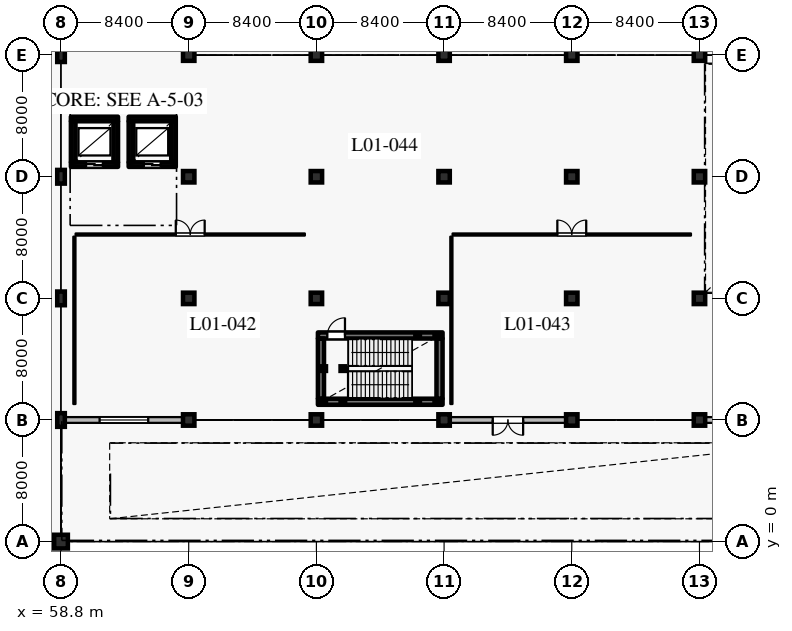
"""IFC4 building model, lengths in metres.
Left out: names, types, materials, properties, quantities, classifications, styles, units other than length and angle.
Written with IfcOpenShell. Run it as: python <this file> out.ifc"""

import sys

from ifc_helpers import new_model, si_unit, direction, frame, frame_2d, origin, origin_2d, place, context, subcontext, project, spatial, rectangle, hollow_rectangle, extrude, element, fill, save


model = new_model("IFC4")
c1 = context("Model", 3, precision=1e-05, world=origin(), true_north=direction((0.0, 1.0)))
c2 = subcontext(c1, "Body", "Model", "MODEL_VIEW")
j1 = project(units=[si_unit("LENGTHUNIT", "METRE"), si_unit("PLANEANGLEUNIT", "RADIAN")], contexts=[c1])
p1 = place(None, origin())
s1 = spatial("IfcSite", under=j1, at=p1, CompositionType="ELEMENT")
p2 = place(p1, origin())
s2 = spatial("IfcBuilding", under=s1, at=p2, CompositionType="ELEMENT")
p3 = place(p2, frame((0.0, 0.0, 6.0)))
s3 = spatial("IfcBuildingStorey", under=s2, at=p3, CompositionType="ELEMENT", Elevation=6.0)
p4 = place(p3, frame((58.8, 0.0, 0.0), z_axis=(0.0, 0.0, 1.0), x_axis=(1.0, 0.0, 0.0)))
e1 = element("IfcColumn", 1, at=p4, inside=s3, PredefinedType="COLUMN", context=c2, shape_type="SweptSolid", body=[
    extrude(rectangle(XDim=0.9, YDim=0.9, at=origin_2d()), origin(), (0.0, 0.0, 1.0), 5.4),
])
for number, where, z_axis, x_axis in (
    (2, (58.8, 8.0, 0.0), (0.0, 0.0, 1.0), (1.0, 0.0, 0.0)),
    (3, (58.8, 16.0, 0.0), (0.0, 0.0, 1.0), (1.0, 0.0, 0.0)),
    (4, (58.8, 24.0, 0.0), (0.0, 0.0, 1.0), (1.0, 0.0, 0.0)),
    (5, (58.8, 32.0, 0.0), (0.0, 0.0, 1.0), (1.0, 0.0, 0.0)),
):
    element("IfcColumn", number, at=place(p3, frame(where, z_axis=z_axis, x_axis=x_axis)), inside=s3, PredefinedType="COLUMN", context=c2, shape_type="SweptSolid", body=[
        extrude(hollow_rectangle(XDim=0.5, YDim=0.9, WallThickness=0.024, at=origin_2d()), origin(), (0.0, 0.0, 1.0), 5.4),
    ])
for number, where, z_axis, x_axis in (
    (6, (67.2, 8.0, 0.0), (0.0, 0.0, 1.0), (1.0, 0.0, 0.0)),
    (7, (67.2, 16.0, 0.0), (0.0, 0.0, 1.0), (1.0, 0.0, 0.0)),
    (8, (67.2, 24.0, 0.0), (0.0, 0.0, 1.0), (1.0, 0.0, 0.0)),
    (9, (67.2, 32.0, 0.0), (0.0, 0.0, 1.0), (1.0, 0.0, 0.0)),
    (10, (75.6, 8.0, 0.0), (0.0, 0.0, 1.0), (1.0, 0.0, 0.0)),
    (11, (75.6, 16.0, 0.0), (0.0, 0.0, 1.0), (1.0, 0.0, 0.0)),
    (12, (75.6, 24.0, 0.0), (0.0, 0.0, 1.0), (1.0, 0.0, 0.0)),
    (13, (75.6, 32.0, 0.0), (0.0, 0.0, 1.0), (1.0, 0.0, 0.0)),
    (14, (84.0, 8.0, 0.0), (0.0, 0.0, 1.0), (1.0, 0.0, 0.0)),
    (15, (84.0, 16.0, 0.0), (0.0, 0.0, 1.0), (1.0, 0.0, 0.0)),
    (16, (84.0, 24.0, 0.0), (0.0, 0.0, 1.0), (1.0, 0.0, 0.0)),
    (17, (84.0, 32.0, 0.0), (0.0, 0.0, 1.0), (1.0, 0.0, 0.0)),
    (18, (92.4, 8.0, 0.0), (0.0, 0.0, 1.0), (1.0, 0.0, 0.0)),
    (19, (92.4, 16.0, 0.0), (0.0, 0.0, 1.0), (1.0, 0.0, 0.0)),
    (20, (92.4, 24.0, 0.0), (0.0, 0.0, 1.0), (1.0, 0.0, 0.0)),
    (21, (92.4, 32.0, 0.0), (0.0, 0.0, 1.0), (1.0, 0.0, 0.0)),
    (22, (100.8, 8.0, 0.0), (0.0, 0.0, 1.0), (1.0, 0.0, 0.0)),
    (23, (100.8, 16.0, 0.0), (0.0, 0.0, 1.0), (1.0, 0.0, 0.0)),
    (24, (100.8, 24.0, 0.0), (0.0, 0.0, 1.0), (1.0, 0.0, 0.0)),
    (25, (100.8, 32.0, 0.0), (0.0, 0.0, 1.0), (1.0, 0.0, 0.0)),
):
    element("IfcColumn", number, at=place(p3, frame(where, z_axis=z_axis, x_axis=x_axis)), inside=s3, PredefinedType="COLUMN", context=c2, shape_type="SweptSolid", body=[
        extrude(rectangle(XDim=0.75, YDim=0.75, at=origin_2d()), origin(), (0.0, 0.0, 1.0), 5.4),
    ])
p5 = place(p3, frame((58.35, 0.0, 0.0), z_axis=(0.0, 0.0, 1.0), x_axis=(-1.0, 0.0, 0.0)))
e26 = element("IfcWall", 26, at=p5, inside=s3, PredefinedType="SOLIDWALL", context=c2, shape_type="SweptSolid", body=[
    extrude(rectangle(XDim=7.5, YDim=0.34, at=frame_2d((3.75, 0.0))), origin(), (0.0, 0.0, 1.0), 4.42),
])
p6 = place(p5, frame((1.95, 0.0, 1.0)))
e27 = element("IfcOpeningElement", 27, at=p6, cuts=e26, PredefinedType="OPENING", context=c2, shape_type="SweptSolid", body=[
    extrude(rectangle(XDim=3.6, YDim=2.5, at=frame_2d((1.8, 1.25))), frame((0.0, 0.18, 0.0), z_axis=(0.0, -1.0, 0.0), x_axis=(1.0, 0.0, 0.0)), (0.0, 0.0, 1.0), 0.36),
])
p7 = place(p3, frame((108.825, 8.0, 0.0), z_axis=(0.0, 0.0, 1.0), x_axis=(-1.0, 0.0, 0.0)))
e28 = element("IfcWall", 28, at=p7, inside=s3, PredefinedType="SOLIDWALL", context=c2, shape_type="SweptSolid", body=[
    extrude(rectangle(XDim=7.65, YDim=0.38, at=frame_2d((3.825, 0.0))), origin(), (0.0, 0.0, 1.0), 4.45),
])
p8 = place(p7, frame((2.825, 0.0, 0.0)))
e29 = element("IfcOpeningElement", 29, at=p8, cuts=e28, PredefinedType="OPENING", context=c2, shape_type="SweptSolid", body=[
    extrude(rectangle(XDim=2.0, YDim=2.4, at=frame_2d((1.0, 1.2))), frame((0.0, 0.2, 0.0), z_axis=(0.0, -1.0, 0.0), x_axis=(1.0, 0.0, 0.0)), (0.0, 0.0, 1.0), 0.4),
])
p9 = place(p3, frame((92.025, 8.0, 0.0), z_axis=(0.0, 0.0, 1.0), x_axis=(-1.0, 0.0, 0.0)))
e30 = element("IfcWall", 30, at=p9, inside=s3, PredefinedType="SOLIDWALL", context=c2, shape_type="SweptSolid", body=[
    extrude(rectangle(XDim=7.65, YDim=0.38, at=frame_2d((3.825, 0.0))), origin(), (0.0, 0.0, 1.0), 4.45),
])
p10 = place(p9, frame((2.825, 0.0, 0.0)))
e31 = element("IfcOpeningElement", 31, at=p10, cuts=e30, PredefinedType="OPENING", context=c2, shape_type="SweptSolid", body=[
    extrude(rectangle(XDim=2.0, YDim=2.4, at=frame_2d((1.0, 1.2))), frame((0.0, 0.2, 0.0), z_axis=(0.0, -1.0, 0.0), x_axis=(1.0, 0.0, 0.0)), (0.0, 0.0, 1.0), 0.4),
])
p11 = place(p3, frame((66.825, 8.0, 0.0), z_axis=(0.0, 0.0, 1.0), x_axis=(-1.0, 0.0, 0.0)))
e32 = element("IfcWall", 32, at=p11, inside=s3, PredefinedType="SOLIDWALL", context=c2, shape_type="SweptSolid", body=[
    extrude(rectangle(XDim=7.775, YDim=0.38, at=frame_2d((3.887, 0.0))), origin(), (0.0, 0.0, 1.0), 4.42),
])
p12 = place(p11, frame((2.288, 0.0, 0.95)))
e33 = element("IfcOpeningElement", 33, at=p12, cuts=e32, PredefinedType="OPENING", context=c2, shape_type="SweptSolid", body=[
    extrude(rectangle(XDim=3.2, YDim=2.4, at=frame_2d((1.6, 1.2))), frame((0.0, 0.2, 0.0), z_axis=(0.0, -1.0, 0.0), x_axis=(1.0, 0.0, 0.0)), (0.0, 0.0, 1.0), 0.4),
])
p13 = place(p3, frame((59.45, 24.8, 0.0), z_axis=(0.0, 0.0, 1.0), x_axis=(1.0, 0.0, 0.0)))
e34 = element("IfcWall", 34, at=p13, inside=s3, PredefinedType="SHEAR", context=c2, shape_type="SweptSolid", body=[
    extrude(rectangle(XDim=3.1, YDim=0.3, at=frame_2d((1.55, 0.0))), origin(), (0.0, 0.0, 1.0), 5.045),
])
p14 = place(p13, frame((1.0, 0.0, 0.0)))
e35 = element("IfcOpeningElement", 35, at=p14, cuts=e34, PredefinedType="OPENING", context=c2, shape_type="SweptSolid", body=[
    extrude(rectangle(XDim=1.1, YDim=2.2, at=frame_2d((0.55, 1.1))), frame((0.0, 0.16, 0.0), z_axis=(0.0, -1.0, 0.0), x_axis=(1.0, 0.0, 0.0)), (0.0, 0.0, 1.0), 0.32),
])
p15 = place(p3, frame((62.4, 24.955, 0.0), z_axis=(0.0, 0.0, 1.0), x_axis=(0.0, 1.0, 0.0)))
e36 = element("IfcWall", 36, at=p15, inside=s3, PredefinedType="SHEAR", context=c2, shape_type="SweptSolid", body=[
    extrude(rectangle(XDim=2.69, YDim=0.3, at=frame_2d((1.345, 0.0))), origin(), (0.0, 0.0, 1.0), 5.045),
])
p16 = place(p3, frame((62.55, 27.8, 0.0), z_axis=(0.0, 0.0, 1.0), x_axis=(-1.0, 0.0, 0.0)))
e37 = element("IfcWall", 37, at=p16, inside=s3, PredefinedType="SHEAR", context=c2, shape_type="SweptSolid", body=[
    extrude(rectangle(XDim=3.1, YDim=0.3, at=frame_2d((1.55, 0.0))), origin(), (0.0, 0.0, 1.0), 5.045),
])
p17 = place(p3, frame((59.6, 27.645, 0.0), z_axis=(0.0, 0.0, 1.0), x_axis=(0.0, -1.0, 0.0)))
e38 = element("IfcWall", 38, at=p17, inside=s3, PredefinedType="SHEAR", context=c2, shape_type="SweptSolid", body=[
    extrude(rectangle(XDim=2.69, YDim=0.3, at=frame_2d((1.345, 0.0))), origin(), (0.0, 0.0, 1.0), 5.045),
])
p18 = place(p3, frame((63.25, 24.8, 0.0), z_axis=(0.0, 0.0, 1.0), x_axis=(1.0, 0.0, 0.0)))
e39 = element("IfcWall", 39, at=p18, inside=s3, PredefinedType="SHEAR", context=c2, shape_type="SweptSolid", body=[
    extrude(rectangle(XDim=3.1, YDim=0.3, at=frame_2d((1.55, 0.0))), origin(), (0.0, 0.0, 1.0), 5.045),
])
p19 = place(p18, frame((1.0, 0.0, 0.0)))
e40 = element("IfcOpeningElement", 40, at=p19, cuts=e39, PredefinedType="OPENING", context=c2, shape_type="SweptSolid", body=[
    extrude(rectangle(XDim=1.1, YDim=2.2, at=frame_2d((0.55, 1.1))), frame((0.0, 0.16, 0.0), z_axis=(0.0, -1.0, 0.0), x_axis=(1.0, 0.0, 0.0)), (0.0, 0.0, 1.0), 0.32),
])
p20 = place(p3, frame((66.2, 24.955, 0.0), z_axis=(0.0, 0.0, 1.0), x_axis=(0.0, 1.0, 0.0)))
e41 = element("IfcWall", 41, at=p20, inside=s3, PredefinedType="SHEAR", context=c2, shape_type="SweptSolid", body=[
    extrude(rectangle(XDim=2.69, YDim=0.3, at=frame_2d((1.345, 0.0))), origin(), (0.0, 0.0, 1.0), 5.045),
])
p21 = place(p3, frame((66.35, 27.8, 0.0), z_axis=(0.0, 0.0, 1.0), x_axis=(-1.0, 0.0, 0.0)))
e42 = element("IfcWall", 42, at=p21, inside=s3, PredefinedType="SHEAR", context=c2, shape_type="SweptSolid", body=[
    extrude(rectangle(XDim=3.1, YDim=0.3, at=frame_2d((1.55, 0.0))), origin(), (0.0, 0.0, 1.0), 5.045),
])
p22 = place(p3, frame((63.4, 27.645, 0.0), z_axis=(0.0, 0.0, 1.0), x_axis=(0.0, -1.0, 0.0)))
e43 = element("IfcWall", 43, at=p22, inside=s3, PredefinedType="SHEAR", context=c2, shape_type="SweptSolid", body=[
    extrude(rectangle(XDim=2.69, YDim=0.3, at=frame_2d((1.345, 0.0))), origin(), (0.0, 0.0, 1.0), 5.045),
])
p23 = place(p3, frame((75.7, 9.2, 0.0), z_axis=(0.0, 0.0, 1.0), x_axis=(1.0, 0.0, 0.0)))
e44 = element("IfcWall", 44, at=p23, inside=s3, PredefinedType="SHEAR", context=c2, shape_type="SweptSolid", body=[
    extrude(rectangle(XDim=8.2, YDim=0.4, at=frame_2d((4.1, 0.0))), origin(), (0.0, 0.0, 1.0), 5.045),
])
p24 = place(p3, frame((83.7, 9.405, 0.0), z_axis=(0.0, 0.0, 1.0), x_axis=(0.0, 1.0, 0.0)))
e45 = element("IfcWall", 45, at=p24, inside=s3, PredefinedType="SHEAR", context=c2, shape_type="SweptSolid", body=[
    extrude(rectangle(XDim=3.95, YDim=0.4, at=frame_2d((1.975, 0.0))), origin(), (0.0, 0.0, 1.0), 5.045),
])
p25 = place(p3, frame((75.7, 13.56, 0.0), z_axis=(0.0, 0.0, 1.0), x_axis=(1.0, 0.0, 0.0)))
e46 = element("IfcWall", 46, at=p25, inside=s3, PredefinedType="SHEAR", context=c2, shape_type="SweptSolid", body=[
    extrude(rectangle(XDim=8.2, YDim=0.4, at=frame_2d((4.1, 0.0))), origin(), (0.0, 0.0, 1.0), 5.045),
])
p26 = place(p25, frame((0.62, 0.0, 0.0)))
e47 = element("IfcOpeningElement", 47, at=p26, cuts=e46, PredefinedType="OPENING", context=c2, shape_type="SweptSolid", body=[
    extrude(rectangle(XDim=1.16, YDim=2.2, at=frame_2d((0.58, 1.1))), frame((0.0, 0.21, 0.0), z_axis=(0.0, -1.0, 0.0), x_axis=(1.0, 0.0, 0.0)), (0.0, 0.0, 1.0), 0.42),
])
p27 = place(p3, frame((75.9, 9.405, 0.0), z_axis=(0.0, 0.0, 1.0), x_axis=(0.0, 1.0, 0.0)))
e48 = element("IfcWall", 48, at=p27, inside=s3, PredefinedType="SHEAR", context=c2, shape_type="SweptSolid", body=[
    extrude(rectangle(XDim=3.95, YDim=0.4, at=frame_2d((1.975, 0.0))), origin(), (0.0, 0.0, 1.0), 5.045),
])
for number, where, z_axis, x_axis in (
    (49, (76.08, 9.2, 0.0), (0.0, 0.0, 1.0), (1.0, 0.0, 0.0)),
    (50, (76.08, 11.38, 0.0), (0.0, 0.0, 1.0), (1.0, 0.0, 0.0)),
    (51, (77.34, 9.2, 0.0), (0.0, 0.0, 1.0), (1.0, 0.0, 0.0)),
    (52, (77.34, 11.38, 0.0), (0.0, 0.0, 1.0), (1.0, 0.0, 0.0)),
):
    element("IfcColumn", number, at=place(p3, frame(where, z_axis=z_axis, x_axis=x_axis)), inside=s3, PredefinedType="COLUMN", context=c2, shape_type="SweptSolid", body=[
        extrude(hollow_rectangle(XDim=0.3, YDim=0.3, WallThickness=0.012, at=origin_2d()), origin(), (0.0, 0.0, 1.0), 5.22),
    ])
for number, where, z_axis, x_axis in (
    (53, (82.26, 9.2, -3.0), (0.0, 0.0, 1.0), (1.0, 0.0, 0.0)),
    (54, (82.26, 13.56, -3.0), (0.0, 0.0, 1.0), (1.0, 0.0, 0.0)),
    (55, (83.52, 9.2, -3.0), (0.0, 0.0, 1.0), (1.0, 0.0, 0.0)),
    (56, (83.52, 13.56, -3.0), (0.0, 0.0, 1.0), (1.0, 0.0, 0.0)),
):
    element("IfcColumn", number, at=place(p3, frame(where, z_axis=z_axis, x_axis=x_axis)), inside=s3, PredefinedType="COLUMN", context=c2, shape_type="SweptSolid", body=[
        extrude(hollow_rectangle(XDim=0.3, YDim=0.3, WallThickness=0.012, at=origin_2d()), origin(), (0.0, 0.0, 1.0), 5.52),
    ])
p28 = place(p3, frame((59.76, 20.2, 0.0), z_axis=(0.0, 0.0, 1.0), x_axis=(1.0, 0.0, 0.0)))
e57 = element("IfcWall", 57, at=p28, inside=s3, PredefinedType="PARTITIONING", context=c2, shape_type="SweptSolid", body=[
    extrude(rectangle(XDim=15.08, YDim=0.14, at=frame_2d((7.54, 0.0))), origin(), (0.0, 0.0, 1.0), 5.045),
])
p29 = place(p28, frame((6.59, 0.0, 0.0)))
e58 = element("IfcOpeningElement", 58, at=p29, cuts=e57, PredefinedType="OPENING", context=c2, shape_type="SweptSolid", body=[
    extrude(rectangle(XDim=1.9, YDim=2.4, at=frame_2d((0.95, 1.2))), frame((0.0, 0.08, 0.0), z_axis=(0.0, -1.0, 0.0), x_axis=(1.0, 0.0, 0.0)), (0.0, 0.0, 1.0), 0.16),
])
p30 = place(p3, frame((59.68, 9.05, 0.0), z_axis=(0.0, 0.0, 1.0), x_axis=(0.0, 1.0, 0.0)))
e59 = element("IfcWall", 59, at=p30, inside=s3, PredefinedType="PARTITIONING", context=c2, shape_type="SweptSolid", body=[
    extrude(rectangle(XDim=11.01, YDim=0.14, at=frame_2d((5.505, 0.0))), origin(), (0.0, 0.0, 1.0), 5.045),
])
p31 = place(p3, frame((84.56, 20.2, 0.0), z_axis=(0.0, 0.0, 1.0), x_axis=(1.0, 0.0, 0.0)))
e60 = element("IfcWall", 60, at=p31, inside=s3, PredefinedType="PARTITIONING", context=c2, shape_type="SweptSolid", body=[
    extrude(rectangle(XDim=15.68, YDim=0.14, at=frame_2d((7.84, 0.0))), origin(), (0.0, 0.0, 1.0), 5.045),
])
p32 = place(p31, frame((6.89, 0.0, 0.0)))
e61 = element("IfcOpeningElement", 61, at=p32, cuts=e60, PredefinedType="OPENING", context=c2, shape_type="SweptSolid", body=[
    extrude(rectangle(XDim=1.9, YDim=2.4, at=frame_2d((0.95, 1.2))), frame((0.0, 0.08, 0.0), z_axis=(0.0, -1.0, 0.0), x_axis=(1.0, 0.0, 0.0)), (0.0, 0.0, 1.0), 0.16),
])
p33 = place(p3, frame((84.48, 9.05, 0.0), z_axis=(0.0, 0.0, 1.0), x_axis=(0.0, 1.0, 0.0)))
e62 = element("IfcWall", 62, at=p33, inside=s3, PredefinedType="PARTITIONING", context=c2, shape_type="SweptSolid", body=[
    extrude(rectangle(XDim=11.01, YDim=0.14, at=frame_2d((5.505, 0.0))), origin(), (0.0, 0.0, 1.0), 5.045),
])
p34 = place(p10, origin())
e63 = element("IfcDoor", 63, at=p34, inside=s3, OperationType="DOUBLE_DOOR_SINGLE_SWING", PredefinedType="DOOR", context=c2, shape_type="SweptSolid", body=[
    extrude(rectangle(XDim=2.0, YDim=2.4, at=frame_2d((1.0, 1.2))), frame((0.0, 0.025, 0.0), z_axis=(0.0, -1.0, 0.0), x_axis=(1.0, 0.0, 0.0)), (0.0, 0.0, 1.0), 0.05),
])
fill(e31, e63)
p35 = place(p12, origin())
e64 = element("IfcWindow", 64, at=p35, inside=s3, PartitioningType="DOUBLE_PANEL_VERTICAL", PredefinedType="WINDOW", context=c2, shape_type="SweptSolid", body=[
    extrude(rectangle(XDim=3.2, YDim=2.4, at=frame_2d((1.6, 1.2))), frame((0.0, 0.03, 0.0), z_axis=(0.0, -1.0, 0.0), x_axis=(1.0, 0.0, 0.0)), (0.0, 0.0, 1.0), 0.06),
])
fill(e33, e64)
p36 = place(p14, origin())
e65 = element("IfcDoor", 65, at=p36, inside=s3, OperationType="DOUBLE_DOOR_SLIDING", PredefinedType="DOOR", context=c2, shape_type="SweptSolid", body=[
    extrude(rectangle(XDim=1.1, YDim=2.2, at=frame_2d((0.55, 1.1))), frame((0.0, 0.025, 0.0), z_axis=(0.0, -1.0, 0.0), x_axis=(1.0, 0.0, 0.0)), (0.0, 0.0, 1.0), 0.05),
])
fill(e35, e65)
p37 = place(p19, origin())
e66 = element("IfcDoor", 66, at=p37, inside=s3, OperationType="DOUBLE_DOOR_SLIDING", PredefinedType="DOOR", context=c2, shape_type="SweptSolid", body=[
    extrude(rectangle(XDim=1.1, YDim=2.2, at=frame_2d((0.55, 1.1))), frame((0.0, 0.025, 0.0), z_axis=(0.0, -1.0, 0.0), x_axis=(1.0, 0.0, 0.0)), (0.0, 0.0, 1.0), 0.05),
])
fill(e40, e66)
p38 = place(p26, origin())
e67 = element("IfcDoor", 67, at=p38, inside=s3, OperationType="SINGLE_SWING_RIGHT", PredefinedType="DOOR", context=c2, shape_type="SweptSolid", body=[
    extrude(rectangle(XDim=1.16, YDim=2.2, at=frame_2d((0.58, 1.1))), frame((0.0, 0.025, 0.0), z_axis=(0.0, -1.0, 0.0), x_axis=(1.0, 0.0, 0.0)), (0.0, 0.0, 1.0), 0.05),
])
fill(e47, e67)
p39 = place(p29, origin())
e68 = element("IfcDoor", 68, at=p39, inside=s3, OperationType="DOUBLE_DOOR_SINGLE_SWING", PredefinedType="DOOR", context=c2, shape_type="SweptSolid", body=[
    extrude(rectangle(XDim=1.9, YDim=2.4, at=frame_2d((0.95, 1.2))), frame((0.0, 0.025, 0.0), z_axis=(0.0, -1.0, 0.0), x_axis=(1.0, 0.0, 0.0)), (0.0, 0.0, 1.0), 0.05),
])
fill(e58, e68)
p40 = place(p32, origin())
e69 = element("IfcDoor", 69, at=p40, inside=s3, OperationType="DOUBLE_DOOR_SINGLE_SWING", PredefinedType="DOOR", context=c2, shape_type="SweptSolid", body=[
    extrude(rectangle(XDim=1.9, YDim=2.4, at=frame_2d((0.95, 1.2))), frame((0.0, 0.025, 0.0), z_axis=(0.0, -1.0, 0.0), x_axis=(1.0, 0.0, 0.0)), (0.0, 0.0, 1.0), 0.05),
])
fill(e61, e69)
save(model, sys.argv[1])
